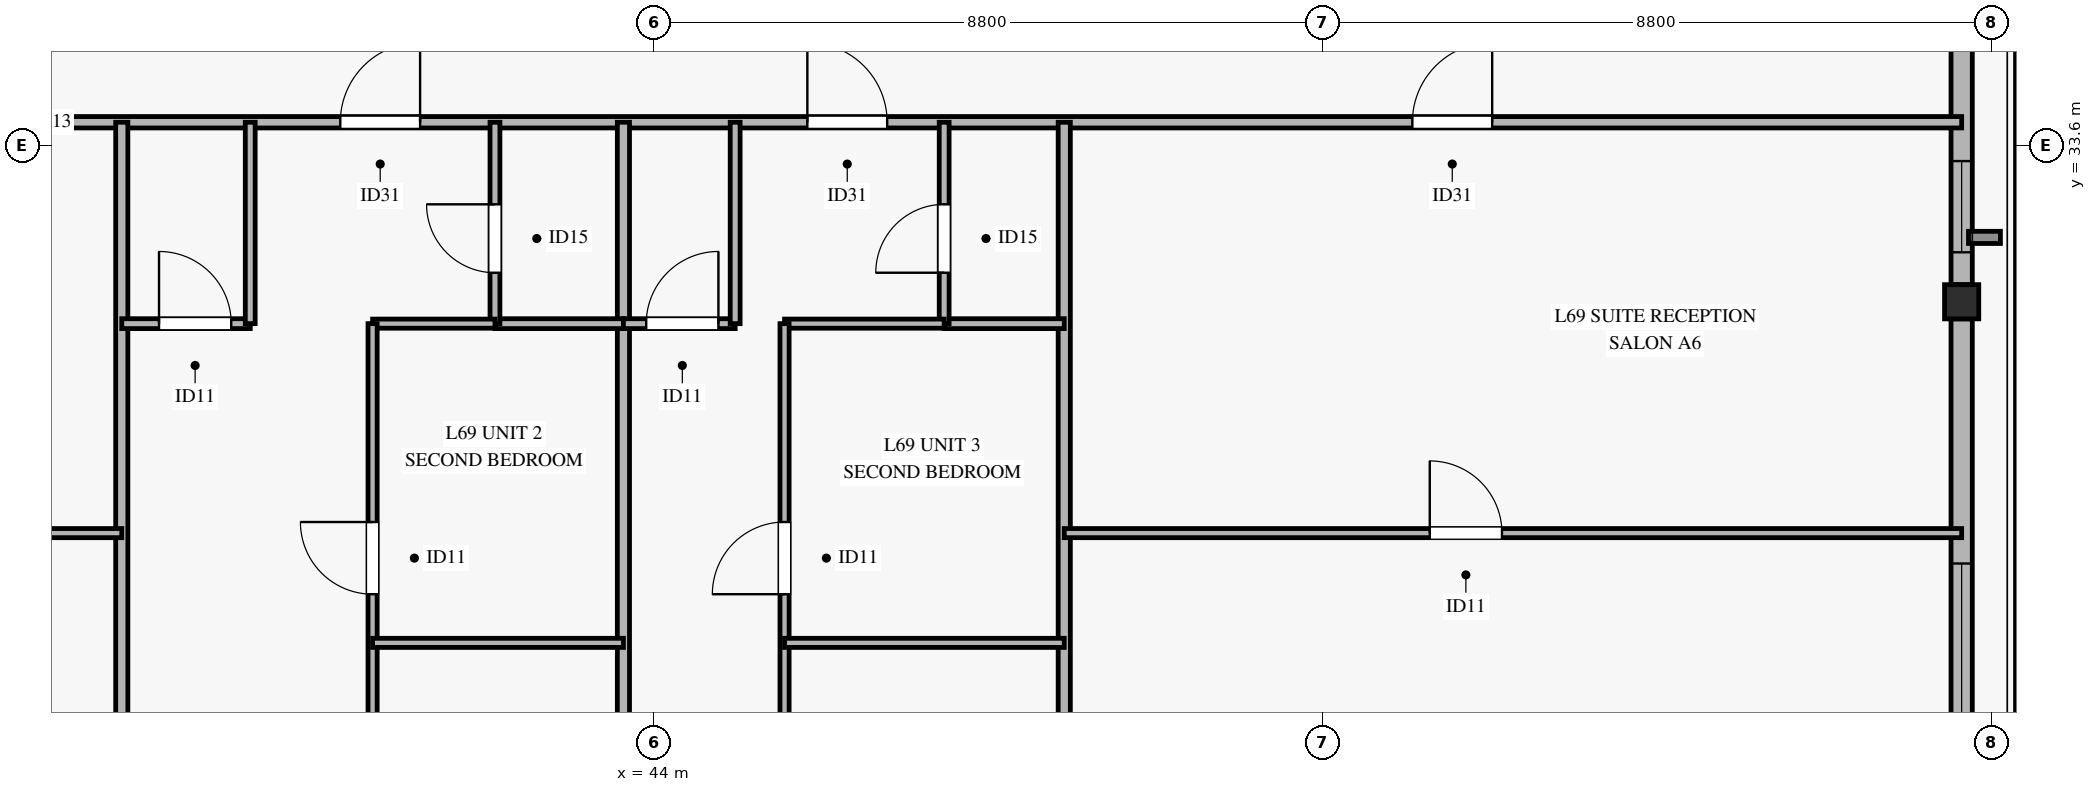
"""IFC4 building model, lengths in metres.
Left out: names, types, materials, properties, quantities, classifications, styles, units other than length and angle.
Written with IfcOpenShell. Run it as: python <this file> out.ifc"""

import sys

from ifc_helpers import new_model, si_unit, direction, frame, frame_2d, origin, origin_2d, place, context, subcontext, project, spatial, rectangle, hollow_rectangle, extrude, source, transform, mapped, element, fill, save


model = new_model("IFC4")
c1 = context("Model", 3, precision=1e-05, world=origin(), true_north=direction((0.0, 1.0)))
c2 = subcontext(c1, "Body", "Model", "MODEL_VIEW")
j1 = project(units=[si_unit("LENGTHUNIT", "METRE"), si_unit("PLANEANGLEUNIT", "RADIAN")], contexts=[c1])
p1 = place(None, origin())
s1 = spatial("IfcSite", under=j1, at=p1, CompositionType="ELEMENT")
p2 = place(p1, origin())
s2 = spatial("IfcBuilding", under=s1, at=p2, CompositionType="ELEMENT")
p3 = place(p2, frame((0.0, 0.0, 268.9)))
s3 = spatial("IfcBuildingStorey", under=s2, at=p3, CompositionType="ELEMENT", Elevation=268.9)
m1 = source(origin(), c2, "Body", "SweptSolid", [
    extrude(hollow_rectangle(XDim=0.45, YDim=0.45, WallThickness=0.022, at=origin_2d()), origin(), (0.0, 0.0, 1.0), 3.185),
])
p4 = place(p3, frame((61.207, 31.538, 0.0), z_axis=(0.0, 0.0, 1.0), x_axis=(1.0, 0.0, 0.0)))
e1 = element("IfcColumn", 1, at=p4, inside=s3, PredefinedType="COLUMN", context=c2, shape_type="MappedRepresentation", body=[
    mapped(m1, transform((0.0, 0.0, 0.0), x_axis=(1.0, 0.0, 0.0), y_axis=(0.0, 1.0, 0.0), z_axis=(0.0, 0.0, 1.0), scale=1.0)),
])
p5 = place(p3, frame((61.207, 19.499, 0.0), z_axis=(0.0, 0.0, 1.0), x_axis=(0.0, 1.0, 0.0)))
e2 = element("IfcWall", 2, at=p5, inside=s3, PredefinedType="SOLIDWALL", context=c2, shape_type="SweptSolid", body=[
    extrude(rectangle(XDim=11.814, YDim=0.28, at=frame_2d((5.907, 0.0))), origin(), (0.0, 0.0, 1.0), 2.815),
])
p6 = place(p5, frame((0.736, 0.0, 0.45)))
e3 = element("IfcOpeningElement", 3, at=p6, cuts=e2, PredefinedType="OPENING", context=c2, shape_type="SweptSolid", body=[
    extrude(rectangle(XDim=2.2, YDim=2.1, at=frame_2d((1.1, 1.05))), frame((0.0, 0.15, 0.0), z_axis=(0.0, -1.0, 0.0), x_axis=(1.0, 0.0, 0.0)), (0.0, 0.0, 1.0), 0.3),
])
p7 = place(p5, frame((6.395, 0.0, 0.45)))
e4 = element("IfcOpeningElement", 4, at=p7, cuts=e2, PredefinedType="OPENING", context=c2, shape_type="SweptSolid", body=[
    extrude(rectangle(XDim=2.2, YDim=2.1, at=frame_2d((1.1, 1.05))), frame((0.0, 0.15, 0.0), z_axis=(0.0, -1.0, 0.0), x_axis=(1.0, 0.0, 0.0)), (0.0, 0.0, 1.0), 0.3),
])
p8 = place(p3, frame((61.207, 31.763, 0.0), z_axis=(0.0, 0.0, 1.0), x_axis=(0.0, 1.0, 0.0)))
e5 = element("IfcWall", 5, at=p8, inside=s3, PredefinedType="SOLIDWALL", context=c2, shape_type="SweptSolid", body=[
    extrude(rectangle(XDim=11.814, YDim=0.28, at=frame_2d((5.907, 0.0))), origin(), (0.0, 0.0, 1.0), 2.815),
])
p9 = place(p8, frame((0.426, 0.0, 0.45)))
e6 = element("IfcOpeningElement", 6, at=p9, cuts=e5, PredefinedType="OPENING", context=c2, shape_type="SweptSolid", body=[
    extrude(rectangle(XDim=1.2, YDim=2.0, at=frame_2d((0.6, 1.0))), frame((0.0, 0.15, 0.0), z_axis=(0.0, -1.0, 0.0), x_axis=(1.0, 0.0, 0.0)), (0.0, 0.0, 1.0), 0.3),
])
p10 = place(p3, frame((9.194, 33.9, 0.0), z_axis=(0.0, 0.0, 1.0), x_axis=(1.0, 0.0, 0.0)))
e7 = element("IfcWall", 7, at=p10, inside=s3, PredefinedType="PARTITIONING", context=c2, shape_type="SweptSolid", body=[
    extrude(rectangle(XDim=52.013, YDim=0.15, at=frame_2d((26.006, 0.0))), origin(), (0.0, 0.0, 1.0), 2.47),
])
p11 = place(p10, frame((5.729, 0.0, 0.0)))
e8 = element("IfcOpeningElement", 8, at=p11, cuts=e7, PredefinedType="OPENING", context=c2, shape_type="SweptSolid", body=[
    extrude(rectangle(XDim=1.05, YDim=2.15, at=frame_2d((0.525, 1.075))), frame((0.0, 0.085, 0.0), z_axis=(0.0, -1.0, 0.0), x_axis=(1.0, 0.0, 0.0)), (0.0, 0.0, 1.0), 0.17),
])
p12 = place(p10, frame((17.231, 0.0, 0.0)))
e9 = element("IfcOpeningElement", 9, at=p12, cuts=e7, PredefinedType="OPENING", context=c2, shape_type="SweptSolid", body=[
    extrude(rectangle(XDim=1.05, YDim=2.15, at=frame_2d((0.525, 1.075))), frame((0.0, 0.085, 0.0), z_axis=(0.0, -1.0, 0.0), x_axis=(1.0, 0.0, 0.0)), (0.0, 0.0, 1.0), 0.17),
])
p13 = place(p10, frame((23.759, 0.0, 0.0)))
e10 = element("IfcOpeningElement", 10, at=p13, cuts=e7, PredefinedType="OPENING", context=c2, shape_type="SweptSolid", body=[
    extrude(rectangle(XDim=1.05, YDim=2.15, at=frame_2d((0.525, 1.075))), frame((0.0, 0.085, 0.0), z_axis=(0.0, -1.0, 0.0), x_axis=(1.0, 0.0, 0.0)), (0.0, 0.0, 1.0), 0.17),
])
p14 = place(p10, frame((30.681, 0.0, 0.0)))
e11 = element("IfcOpeningElement", 11, at=p14, cuts=e7, PredefinedType="OPENING", context=c2, shape_type="SweptSolid", body=[
    extrude(rectangle(XDim=1.05, YDim=2.15, at=frame_2d((0.525, 1.075))), frame((0.0, 0.085, 0.0), z_axis=(0.0, -1.0, 0.0), x_axis=(1.0, 0.0, 0.0)), (0.0, 0.0, 1.0), 0.17),
])
p15 = place(p10, frame((36.826, 0.0, 0.0)))
e12 = element("IfcOpeningElement", 12, at=p15, cuts=e7, PredefinedType="OPENING", context=c2, shape_type="SweptSolid", body=[
    extrude(rectangle(XDim=1.05, YDim=2.15, at=frame_2d((0.525, 1.075))), frame((0.0, 0.085, 0.0), z_axis=(0.0, -1.0, 0.0), x_axis=(1.0, 0.0, 0.0)), (0.0, 0.0, 1.0), 0.17),
])
p16 = place(p10, frame((44.786, 0.0, 0.0)))
e13 = element("IfcOpeningElement", 13, at=p16, cuts=e7, PredefinedType="OPENING", context=c2, shape_type="SweptSolid", body=[
    extrude(rectangle(XDim=1.05, YDim=2.15, at=frame_2d((0.525, 1.075))), frame((0.0, 0.085, 0.0), z_axis=(0.0, -1.0, 0.0), x_axis=(1.0, 0.0, 0.0)), (0.0, 0.0, 1.0), 0.17),
])
for number, where, z_axis, x_axis in (
    (14, (37.0, 16.976, 0.0), (0.0, 0.0, 1.0), (0.0, 1.0, 0.0)),
    (15, (43.6, 16.976, 0.0), (0.0, 0.0, 1.0), (0.0, 1.0, 0.0)),
    (16, (49.4, 16.976, 0.0), (0.0, 0.0, 1.0), (0.0, 1.0, 0.0)),
):
    element("IfcWall", number, at=place(p3, frame(where, z_axis=z_axis, x_axis=x_axis)), inside=s3, PredefinedType="PARTITIONING", context=c2, shape_type="SweptSolid", body=[
        extrude(rectangle(XDim=16.924, YDim=0.16, at=frame_2d((8.462, 0.0))), origin(), (0.0, 0.0, 1.0), 2.77),
    ])
p17 = place(p3, frame((30.2, 28.494, 0.0), z_axis=(0.0, 0.0, 1.0), x_axis=(1.0, 0.0, 0.0)))
e17 = element("IfcWall", 17, at=p17, inside=s3, PredefinedType="PARTITIONING", context=c2, shape_type="SweptSolid", body=[
    extrude(rectangle(XDim=6.8, YDim=0.12, at=frame_2d((3.4, 0.0))), origin(), (0.0, 0.0, 1.0), 2.47),
])
p18 = place(p17, frame((2.886, 0.0, 0.0)))
e18 = element("IfcOpeningElement", 18, at=p18, cuts=e17, PredefinedType="OPENING", context=c2, shape_type="SweptSolid", body=[
    extrude(rectangle(XDim=0.95, YDim=2.1, at=frame_2d((0.475, 1.05))), frame((0.0, 0.07, 0.0), z_axis=(0.0, -1.0, 0.0), x_axis=(1.0, 0.0, 0.0)), (0.0, 0.0, 1.0), 0.14),
])
p19 = place(p3, frame((37.0, 31.25, 0.0), z_axis=(0.0, 0.0, 1.0), x_axis=(1.0, 0.0, 0.0)))
e19 = element("IfcWall", 19, at=p19, inside=s3, PredefinedType="PARTITIONING", context=c2, shape_type="SweptSolid", body=[
    extrude(rectangle(XDim=1.69, YDim=0.13, at=frame_2d((0.845, 0.0))), origin(), (0.0, 0.0, 1.0), 2.47),
])
p20 = place(p19, frame((0.49, 0.0, 0.0)))
e20 = element("IfcOpeningElement", 20, at=p20, cuts=e19, PredefinedType="OPENING", context=c2, shape_type="SweptSolid", body=[
    extrude(rectangle(XDim=0.95, YDim=2.1, at=frame_2d((0.475, 1.05))), frame((0.0, 0.075, 0.0), z_axis=(0.0, -1.0, 0.0), x_axis=(1.0, 0.0, 0.0)), (0.0, 0.0, 1.0), 0.15),
])
p21 = place(p3, frame((38.69, 31.25, 0.0), z_axis=(0.0, 0.0, 1.0), x_axis=(0.0, 1.0, 0.0)))
e21 = element("IfcWall", 21, at=p21, inside=s3, PredefinedType="PARTITIONING", context=c2, shape_type="SweptSolid", body=[
    extrude(rectangle(XDim=2.65, YDim=0.13, at=frame_2d((1.325, 0.0))), origin(), (0.0, 0.0, 1.0), 2.77),
])
p22 = place(p3, frame((41.91, 31.25, 0.0), z_axis=(0.0, 0.0, 1.0), x_axis=(1.0, 0.0, 0.0)))
e22 = element("IfcWall", 22, at=p22, inside=s3, PredefinedType="PARTITIONING", context=c2, shape_type="SweptSolid", body=[
    extrude(rectangle(XDim=1.69, YDim=0.13, at=frame_2d((0.845, 0.0))), origin(), (0.0, 0.0, 1.0), 3.185),
])
p23 = place(p3, frame((41.91, 31.25, 0.0), z_axis=(0.0, 0.0, 1.0), x_axis=(0.0, 1.0, 0.0)))
e23 = element("IfcWall", 23, at=p23, inside=s3, PredefinedType="PARTITIONING", context=c2, shape_type="SweptSolid", body=[
    extrude(rectangle(XDim=2.65, YDim=0.13, at=frame_2d((1.325, 0.0))), origin(), (0.0, 0.0, 1.0), 2.77),
])
p24 = place(p23, frame((0.67, 0.0, 0.0)))
e24 = element("IfcOpeningElement", 24, at=p24, cuts=e23, PredefinedType="OPENING", context=c2, shape_type="SweptSolid", body=[
    extrude(rectangle(XDim=0.9, YDim=2.1, at=frame_2d((0.45, 1.05))), frame((0.0, 0.075, 0.0), z_axis=(0.0, -1.0, 0.0), x_axis=(1.0, 0.0, 0.0)), (0.0, 0.0, 1.0), 0.15),
])
p25 = place(p3, frame((40.3, 31.25, 0.0), z_axis=(0.0, 0.0, 1.0), x_axis=(1.0, 0.0, 0.0)))
e25 = element("IfcWall", 25, at=p25, inside=s3, PredefinedType="PARTITIONING", context=c2, shape_type="SweptSolid", body=[
    extrude(rectangle(XDim=1.61, YDim=0.12, at=frame_2d((0.805, 0.0))), origin(), (0.0, 0.0, 1.0), 3.185),
])
p26 = place(p3, frame((40.3, 16.976, 0.0), z_axis=(0.0, 0.0, 1.0), x_axis=(0.0, 1.0, 0.0)))
e26 = element("IfcWall", 26, at=p26, inside=s3, PredefinedType="PARTITIONING", context=c2, shape_type="SweptSolid", body=[
    extrude(rectangle(XDim=14.274, YDim=0.12, at=frame_2d((7.137, 0.0))), origin(), (0.0, 0.0, 1.0), 2.77),
])
p27 = place(p26, frame((1.59, 0.0, 0.0)))
e27 = element("IfcOpeningElement", 27, at=p27, cuts=e26, PredefinedType="OPENING", context=c2, shape_type="SweptSolid", body=[
    extrude(rectangle(XDim=0.95, YDim=2.1, at=frame_2d((0.475, 1.05))), frame((0.0, 0.07, 0.0), z_axis=(0.0, -1.0, 0.0), x_axis=(1.0, 0.0, 0.0)), (0.0, 0.0, 1.0), 0.14),
])
p28 = place(p26, frame((10.714, 0.0, 0.0)))
e28 = element("IfcOpeningElement", 28, at=p28, cuts=e26, PredefinedType="OPENING", context=c2, shape_type="SweptSolid", body=[
    extrude(rectangle(XDim=0.95, YDim=2.1, at=frame_2d((0.475, 1.05))), frame((0.0, 0.07, 0.0), z_axis=(0.0, -1.0, 0.0), x_axis=(1.0, 0.0, 0.0)), (0.0, 0.0, 1.0), 0.14),
])
p29 = place(p3, frame((40.3, 27.05, 0.0), z_axis=(0.0, 0.0, 1.0), x_axis=(1.0, 0.0, 0.0)))
e29 = element("IfcWall", 29, at=p29, inside=s3, PredefinedType="PARTITIONING", context=c2, shape_type="SweptSolid", body=[
    extrude(rectangle(XDim=3.3, YDim=0.12, at=frame_2d((1.65, 0.0))), origin(), (0.0, 0.0, 1.0), 2.77),
])
p30 = place(p3, frame((43.6, 31.25, 0.0), z_axis=(0.0, 0.0, 1.0), x_axis=(1.0, 0.0, 0.0)))
e30 = element("IfcWall", 30, at=p30, inside=s3, PredefinedType="PARTITIONING", context=c2, shape_type="SweptSolid", body=[
    extrude(rectangle(XDim=1.47, YDim=0.13, at=frame_2d((0.735, 0.0))), origin(), (0.0, 0.0, 1.0), 2.47),
])
p31 = place(p30, frame((0.3, 0.0, 0.0)))
e31 = element("IfcOpeningElement", 31, at=p31, cuts=e30, PredefinedType="OPENING", context=c2, shape_type="SweptSolid", body=[
    extrude(rectangle(XDim=0.95, YDim=2.1, at=frame_2d((0.475, 1.05))), frame((0.0, 0.075, 0.0), z_axis=(0.0, -1.0, 0.0), x_axis=(1.0, 0.0, 0.0)), (0.0, 0.0, 1.0), 0.15),
])
p32 = place(p3, frame((45.07, 31.25, 0.0), z_axis=(0.0, 0.0, 1.0), x_axis=(0.0, 1.0, 0.0)))
e32 = element("IfcWall", 32, at=p32, inside=s3, PredefinedType="PARTITIONING", context=c2, shape_type="SweptSolid", body=[
    extrude(rectangle(XDim=2.65, YDim=0.13, at=frame_2d((1.325, 0.0))), origin(), (0.0, 0.0, 1.0), 2.77),
])
p33 = place(p3, frame((47.82, 31.25, 0.0), z_axis=(0.0, 0.0, 1.0), x_axis=(1.0, 0.0, 0.0)))
e33 = element("IfcWall", 33, at=p33, inside=s3, PredefinedType="PARTITIONING", context=c2, shape_type="SweptSolid", body=[
    extrude(rectangle(XDim=1.58, YDim=0.13, at=frame_2d((0.79, 0.0))), origin(), (0.0, 0.0, 1.0), 3.185),
])
p34 = place(p3, frame((47.82, 31.25, 0.0), z_axis=(0.0, 0.0, 1.0), x_axis=(0.0, 1.0, 0.0)))
e34 = element("IfcWall", 34, at=p34, inside=s3, PredefinedType="PARTITIONING", context=c2, shape_type="SweptSolid", body=[
    extrude(rectangle(XDim=2.65, YDim=0.13, at=frame_2d((1.325, 0.0))), origin(), (0.0, 0.0, 1.0), 2.77),
])
p35 = place(p34, frame((0.67, 0.0, 0.0)))
e35 = element("IfcOpeningElement", 35, at=p35, cuts=e34, PredefinedType="OPENING", context=c2, shape_type="SweptSolid", body=[
    extrude(rectangle(XDim=0.9, YDim=2.1, at=frame_2d((0.45, 1.05))), frame((0.0, 0.075, 0.0), z_axis=(0.0, -1.0, 0.0), x_axis=(1.0, 0.0, 0.0)), (0.0, 0.0, 1.0), 0.15),
])
p36 = place(p3, frame((45.72, 31.25, 0.0), z_axis=(0.0, 0.0, 1.0), x_axis=(1.0, 0.0, 0.0)))
e36 = element("IfcWall", 36, at=p36, inside=s3, PredefinedType="PARTITIONING", context=c2, shape_type="SweptSolid", body=[
    extrude(rectangle(XDim=2.1, YDim=0.12, at=frame_2d((1.05, 0.0))), origin(), (0.0, 0.0, 1.0), 3.185),
])
p37 = place(p3, frame((45.72, 16.976, 0.0), z_axis=(0.0, 0.0, 1.0), x_axis=(0.0, 1.0, 0.0)))
e37 = element("IfcWall", 37, at=p37, inside=s3, PredefinedType="PARTITIONING", context=c2, shape_type="SweptSolid", body=[
    extrude(rectangle(XDim=14.274, YDim=0.12, at=frame_2d((7.137, 0.0))), origin(), (0.0, 0.0, 1.0), 2.77),
])
p38 = place(p37, frame((0.67, 0.0, 0.0)))
e38 = element("IfcOpeningElement", 38, at=p38, cuts=e37, PredefinedType="OPENING", context=c2, shape_type="SweptSolid", body=[
    extrude(rectangle(XDim=0.95, YDim=2.1, at=frame_2d((0.475, 1.05))), frame((0.0, 0.07, 0.0), z_axis=(0.0, -1.0, 0.0), x_axis=(1.0, 0.0, 0.0)), (0.0, 0.0, 1.0), 0.14),
])
p39 = place(p37, frame((10.714, 0.0, 0.0)))
e39 = element("IfcOpeningElement", 39, at=p39, cuts=e37, PredefinedType="OPENING", context=c2, shape_type="SweptSolid", body=[
    extrude(rectangle(XDim=0.95, YDim=2.1, at=frame_2d((0.475, 1.05))), frame((0.0, 0.07, 0.0), z_axis=(0.0, -1.0, 0.0), x_axis=(1.0, 0.0, 0.0)), (0.0, 0.0, 1.0), 0.14),
])
p40 = place(p3, frame((45.72, 27.05, 0.0), z_axis=(0.0, 0.0, 1.0), x_axis=(1.0, 0.0, 0.0)))
e40 = element("IfcWall", 40, at=p40, inside=s3, PredefinedType="PARTITIONING", context=c2, shape_type="SweptSolid", body=[
    extrude(rectangle(XDim=3.68, YDim=0.12, at=frame_2d((1.84, 0.0))), origin(), (0.0, 0.0, 1.0), 2.77),
])
p41 = place(p3, frame((49.4, 28.494, 0.0), z_axis=(0.0, 0.0, 1.0), x_axis=(1.0, 0.0, 0.0)))
e41 = element("IfcWall", 41, at=p41, inside=s3, PredefinedType="PARTITIONING", context=c2, shape_type="SweptSolid", body=[
    extrude(rectangle(XDim=11.807, YDim=0.12, at=frame_2d((5.904, 0.0))), origin(), (0.0, 0.0, 1.0), 2.47),
])
p42 = place(p41, frame((4.809, 0.0, 0.0)))
e42 = element("IfcOpeningElement", 42, at=p42, cuts=e41, PredefinedType="OPENING", context=c2, shape_type="SweptSolid", body=[
    extrude(rectangle(XDim=0.95, YDim=2.1, at=frame_2d((0.475, 1.05))), frame((0.0, 0.07, 0.0), z_axis=(0.0, -1.0, 0.0), x_axis=(1.0, 0.0, 0.0)), (0.0, 0.0, 1.0), 0.14),
])
m2 = source(origin(), c2, "Body", "SweptSolid", [
    extrude(rectangle(XDim=2.2, YDim=2.1, at=frame_2d((1.1, 1.05))), frame((0.0, 0.03, 0.0), z_axis=(0.0, -1.0, 0.0), x_axis=(1.0, 0.0, 0.0)), (0.0, 0.0, 1.0), 0.06),
])
p43 = place(p7, origin())
e43 = element("IfcWindow", 43, at=p43, inside=s3, PartitioningType="SINGLE_PANEL", PredefinedType="WINDOW", context=c2, shape_type="MappedRepresentation", body=[
    mapped(m2, transform((0.0, 0.0, 0.0), x_axis=(1.0, 0.0, 0.0), y_axis=(0.0, 1.0, 0.0), z_axis=(0.0, 0.0, 1.0), scale=1.0)),
])
fill(e4, e43)
m3 = source(origin(), c2, "Body", "SweptSolid", [
    extrude(rectangle(XDim=1.2, YDim=2.0, at=frame_2d((0.6, 1.0))), frame((0.0, 0.03, 0.0), z_axis=(0.0, -1.0, 0.0), x_axis=(1.0, 0.0, 0.0)), (0.0, 0.0, 1.0), 0.06),
])
p44 = place(p9, origin())
e44 = element("IfcWindow", 44, at=p44, inside=s3, PartitioningType="SINGLE_PANEL", PredefinedType="WINDOW", context=c2, shape_type="MappedRepresentation", body=[
    mapped(m3, transform((0.0, 0.0, 0.0), x_axis=(1.0, 0.0, 0.0), y_axis=(0.0, 1.0, 0.0), z_axis=(0.0, 0.0, 1.0), scale=1.0)),
])
fill(e6, e44)
m4 = source(origin(), c2, "Body", "SweptSolid", [
    extrude(rectangle(XDim=1.05, YDim=2.15, at=frame_2d((0.525, 1.075))), frame((0.0, 0.025, 0.0), z_axis=(0.0, -1.0, 0.0), x_axis=(1.0, 0.0, 0.0)), (0.0, 0.0, 1.0), 0.05),
])
p45 = place(p14, origin())
e45 = element("IfcDoor", 45, at=p45, inside=s3, OperationType="SINGLE_SWING_RIGHT", PredefinedType="DOOR", context=c2, shape_type="MappedRepresentation", body=[
    mapped(m4, transform((0.0, 0.0, 0.0), x_axis=(1.0, 0.0, 0.0), y_axis=(0.0, 1.0, 0.0), z_axis=(0.0, 0.0, 1.0), scale=1.0)),
])
fill(e11, e45)
m5 = source(origin(), c2, "Body", "SweptSolid", [
    extrude(rectangle(XDim=0.95, YDim=2.1, at=frame_2d((0.475, 1.05))), frame((0.0, 0.025, 0.0), z_axis=(0.0, -1.0, 0.0), x_axis=(1.0, 0.0, 0.0)), (0.0, 0.0, 1.0), 0.05),
])
p46 = place(p20, origin())
e46 = element("IfcDoor", 46, at=p46, inside=s3, OperationType="SINGLE_SWING_LEFT", PredefinedType="DOOR", context=c2, shape_type="MappedRepresentation", body=[
    mapped(m5, transform((0.0, 0.0, 0.0), x_axis=(1.0, 0.0, 0.0), y_axis=(0.0, 1.0, 0.0), z_axis=(0.0, 0.0, 1.0), scale=1.0)),
])
fill(e20, e46)
m6 = source(origin(), c2, "Body", "SweptSolid", [
    extrude(rectangle(XDim=0.9, YDim=2.1, at=frame_2d((0.45, 1.05))), frame((0.0, 0.025, 0.0), z_axis=(0.0, -1.0, 0.0), x_axis=(1.0, 0.0, 0.0)), (0.0, 0.0, 1.0), 0.05),
])
p47 = place(p24, origin())
e47 = element("IfcDoor", 47, at=p47, inside=s3, OperationType="SINGLE_SWING_RIGHT", PredefinedType="DOOR", context=c2, shape_type="MappedRepresentation", body=[
    mapped(m6, transform((0.0, 0.0, 0.0), x_axis=(1.0, 0.0, 0.0), y_axis=(0.0, 1.0, 0.0), z_axis=(0.0, 0.0, 1.0), scale=1.0)),
])
fill(e24, e47)
p48 = place(p28, origin())
e48 = element("IfcDoor", 48, at=p48, inside=s3, OperationType="SINGLE_SWING_RIGHT", PredefinedType="DOOR", context=c2, shape_type="MappedRepresentation", body=[
    mapped(m5, transform((0.0, 0.0, 0.0), x_axis=(1.0, 0.0, 0.0), y_axis=(0.0, 1.0, 0.0), z_axis=(0.0, 0.0, 1.0), scale=1.0)),
])
fill(e28, e48)
p49 = place(p15, origin())
e49 = element("IfcDoor", 49, at=p49, inside=s3, OperationType="SINGLE_SWING_LEFT", PredefinedType="DOOR", context=c2, shape_type="MappedRepresentation", body=[
    mapped(m4, transform((0.0, 0.0, 0.0), x_axis=(1.0, 0.0, 0.0), y_axis=(0.0, 1.0, 0.0), z_axis=(0.0, 0.0, 1.0), scale=1.0)),
])
fill(e12, e49)
p50 = place(p31, origin())
e50 = element("IfcDoor", 50, at=p50, inside=s3, OperationType="SINGLE_SWING_RIGHT", PredefinedType="DOOR", context=c2, shape_type="MappedRepresentation", body=[
    mapped(m5, transform((0.0, 0.0, 0.0), x_axis=(1.0, 0.0, 0.0), y_axis=(0.0, 1.0, 0.0), z_axis=(0.0, 0.0, 1.0), scale=1.0)),
])
fill(e31, e50)
p51 = place(p35, origin())
e51 = element("IfcDoor", 51, at=p51, inside=s3, OperationType="SINGLE_SWING_LEFT", PredefinedType="DOOR", context=c2, shape_type="MappedRepresentation", body=[
    mapped(m6, transform((0.0, 0.0, 0.0), x_axis=(1.0, 0.0, 0.0), y_axis=(0.0, 1.0, 0.0), z_axis=(0.0, 0.0, 1.0), scale=1.0)),
])
fill(e35, e51)
p52 = place(p39, origin())
e52 = element("IfcDoor", 52, at=p52, inside=s3, OperationType="SINGLE_SWING_LEFT", PredefinedType="DOOR", context=c2, shape_type="MappedRepresentation", body=[
    mapped(m5, transform((0.0, 0.0, 0.0), x_axis=(1.0, 0.0, 0.0), y_axis=(0.0, 1.0, 0.0), z_axis=(0.0, 0.0, 1.0), scale=1.0)),
])
fill(e39, e52)
p53 = place(p16, origin())
e53 = element("IfcDoor", 53, at=p53, inside=s3, OperationType="SINGLE_SWING_RIGHT", PredefinedType="DOOR", context=c2, shape_type="MappedRepresentation", body=[
    mapped(m4, transform((0.0, 0.0, 0.0), x_axis=(1.0, 0.0, 0.0), y_axis=(0.0, 1.0, 0.0), z_axis=(0.0, 0.0, 1.0), scale=1.0)),
])
fill(e13, e53)
p54 = place(p42, origin())
e54 = element("IfcDoor", 54, at=p54, inside=s3, OperationType="SINGLE_SWING_LEFT", PredefinedType="DOOR", context=c2, shape_type="MappedRepresentation", body=[
    mapped(m5, transform((0.0, 0.0, 0.0), x_axis=(1.0, 0.0, 0.0), y_axis=(0.0, 1.0, 0.0), z_axis=(0.0, 0.0, 1.0), scale=1.0)),
])
fill(e42, e54)
save(model, sys.argv[1])
